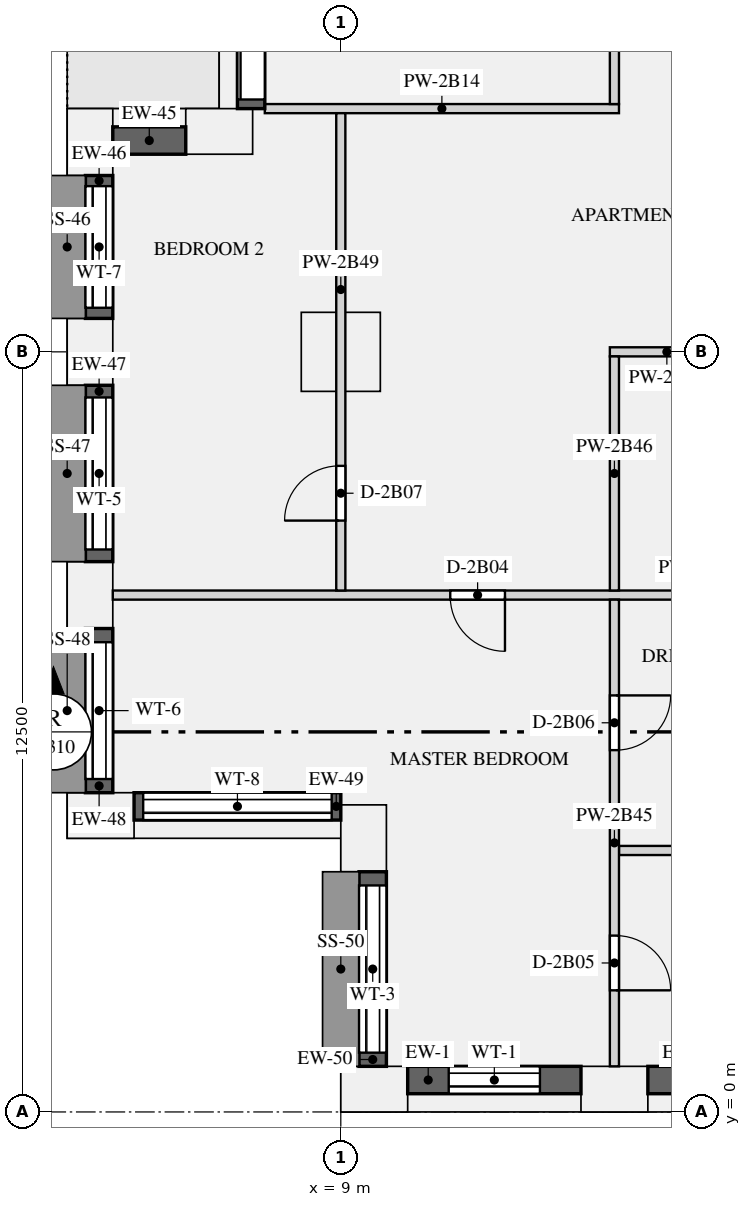
"""IFC4 building model, lengths in metres.
Left out: names, types, materials, properties, quantities, classifications, styles, units other than length and angle.
Written with IfcOpenShell. Run it as: python <this file> out.ifc"""

import sys

from ifc_helpers import new_model, si_unit, direction, frame, frame_2d, origin, origin_2d, place, context, subcontext, project, spatial, rectangle, extrude, element, fill, save


model = new_model("IFC4")
c1 = context("Model", 3, precision=1e-05, world=origin(), true_north=direction((0.0, 1.0)))
c2 = subcontext(c1, "Body", "Model", "MODEL_VIEW")
j1 = project(units=[si_unit("LENGTHUNIT", "METRE"), si_unit("PLANEANGLEUNIT", "RADIAN")], contexts=[c1])
p1 = place(None, origin())
s1 = spatial("IfcSite", under=j1, at=p1, CompositionType="ELEMENT")
p2 = place(p1, origin())
s2 = spatial("IfcBuilding", under=s1, at=p2, CompositionType="ELEMENT")
p3 = place(p2, frame((0.0, 0.0, 93.0)))
s3 = spatial("IfcBuildingStorey", under=s2, at=p3, CompositionType="ELEMENT", Elevation=93.0)
for number, where, z_axis, x_axis in (
    (1, (9.55, 0.375, 0.0), (0.0, 0.0, 1.0), (1.0, 0.0, 0.0)),
    (2, (13.5, 0.375, 0.0), (0.0, 0.0, 1.0), (1.0, 0.0, 0.0)),
    (3, (7.0, 16.125, 0.0), (0.0, 0.0, 1.0), (-1.0, 0.0, 0.0)),
    (4, (4.875, 15.95, 0.0), (0.0, 0.0, 1.0), (0.0, -1.0, 0.0)),
    (5, (4.875, 12.5, 0.0), (0.0, 0.0, 1.0), (0.0, -1.0, 0.0)),
    (6, (4.875, 8.5, 0.0), (0.0, 0.0, 1.0), (0.0, -1.0, 0.0)),
    (7, (5.05, 4.875, 0.0), (0.0, 0.0, 1.0), (1.0, 0.0, 0.0)),
    (8, (9.375, 4.5, 0.0), (0.0, 0.0, 1.0), (0.0, -1.0, 0.0)),
):
    element("IfcColumn", number, at=place(p3, frame(where, z_axis=z_axis, x_axis=x_axis)), inside=s3, PredefinedType="USERDEFINED", context=c2, shape_type="SweptSolid", body=[
        extrude(rectangle(XDim=1.1, YDim=0.75, at=origin_2d()), origin(), (0.0, 0.0, 1.0), 3.15),
    ])
p4 = place(p3, frame((9.0, 12.5, 0.0), z_axis=(0.0, 0.0, 1.0), x_axis=(1.0, 0.0, 0.0)))
e9 = element("IfcColumn", 9, at=p4, inside=s3, PredefinedType="COLUMN", context=c2, shape_type="SweptSolid", body=[
    extrude(rectangle(XDim=1.3, YDim=1.3, at=origin_2d()), origin(), (0.0, 0.0, 1.0), 3.15),
])
p5 = place(p3, frame((10.1, 0.525, 0.9), z_axis=(0.0, 0.0, 1.0), x_axis=(1.0, 0.0, 0.0)))
e10 = element("IfcWall", 10, at=p5, inside=s3, PredefinedType="SOLIDWALL", context=c2, shape_type="SweptSolid", body=[
    extrude(rectangle(XDim=2.85, YDim=0.45, at=frame_2d((1.425, 0.0))), origin(), (0.0, 0.0, 1.0), 1.93),
])
p6 = place(p5, frame((0.675, 0.0, 0.15)))
e11 = element("IfcOpeningElement", 11, at=p6, cuts=e10, PredefinedType="OPENING", context=c2, shape_type="SweptSolid", body=[
    extrude(rectangle(XDim=1.5, YDim=1.5, at=frame_2d((0.75, 0.75))), frame((0.0, 0.235, 0.0), z_axis=(0.0, -1.0, 0.0), x_axis=(1.0, 0.0, 0.0)), (0.0, 0.0, 1.0), 0.47),
])
p7 = place(p3, frame((14.05, 0.525, 0.9), z_axis=(0.0, 0.0, 1.0), x_axis=(1.0, 0.0, 0.0)))
e12 = element("IfcWall", 12, at=p7, inside=s3, PredefinedType="SOLIDWALL", context=c2, shape_type="SweptSolid", body=[
    extrude(rectangle(XDim=3.95, YDim=0.45, at=frame_2d((1.975, 0.0))), origin(), (0.0, 0.0, 1.0), 1.93),
])
p8 = place(p7, frame((1.225, 0.0, 0.15)))
e13 = element("IfcOpeningElement", 13, at=p8, cuts=e12, PredefinedType="OPENING", context=c2, shape_type="SweptSolid", body=[
    extrude(rectangle(XDim=1.5, YDim=1.5, at=frame_2d((0.75, 0.75))), frame((0.0, 0.235, 0.0), z_axis=(0.0, -1.0, 0.0), x_axis=(1.0, 0.0, 0.0)), (0.0, 0.0, 1.0), 0.47),
])
p9 = place(p3, frame((7.525, 19.95, 0.0), z_axis=(0.0, 0.0, 1.0), x_axis=(0.0, -1.0, 0.0)))
e14 = element("IfcWall", 14, at=p9, inside=s3, PredefinedType="SOLIDWALL", context=c2, shape_type="SweptSolid", body=[
    extrude(rectangle(XDim=3.45, YDim=0.45, at=frame_2d((1.725, 0.0))), origin(), (0.0, 0.0, 1.0), 2.83),
])
p10 = place(p9, frame((0.15, 0.0, 0.0)))
e15 = element("IfcOpeningElement", 15, at=p10, cuts=e14, PredefinedType="OPENING", context=c2, shape_type="SweptSolid", body=[
    extrude(rectangle(XDim=3.15, YDim=2.3, at=frame_2d((1.575, 1.15))), frame((0.0, 0.235, 0.0), z_axis=(0.0, -1.0, 0.0), x_axis=(1.0, 0.0, 0.0)), (0.0, 0.0, 1.0), 0.47),
])
p11 = place(p3, frame((6.45, 15.975, 0.9), z_axis=(0.0, 0.0, 1.0), x_axis=(-1.0, 0.0, 0.0)))
e16 = element("IfcWall", 16, at=p11, inside=s3, PredefinedType="SOLIDWALL", context=c2, shape_type="SweptSolid", body=[
    extrude(rectangle(XDim=1.2, YDim=0.45, at=frame_2d((0.6, 0.0))), origin(), (0.0, 0.0, 1.0), 1.93),
])
p12 = place(p3, frame((5.025, 15.4, 0.9), z_axis=(0.0, 0.0, 1.0), x_axis=(0.0, -1.0, 0.0)))
e17 = element("IfcWall", 17, at=p12, inside=s3, PredefinedType="SOLIDWALL", context=c2, shape_type="SweptSolid", body=[
    extrude(rectangle(XDim=2.35, YDim=0.45, at=frame_2d((1.175, 0.0))), origin(), (0.0, 0.0, 1.0), 1.93),
])
p13 = place(p12, frame((0.175, 0.0, 0.15)))
e18 = element("IfcOpeningElement", 18, at=p13, cuts=e17, PredefinedType="OPENING", context=c2, shape_type="SweptSolid", body=[
    extrude(rectangle(XDim=2.0, YDim=1.5, at=frame_2d((1.0, 0.75))), frame((0.0, 0.235, 0.0), z_axis=(0.0, -1.0, 0.0), x_axis=(1.0, 0.0, 0.0)), (0.0, 0.0, 1.0), 0.47),
])
p14 = place(p3, frame((5.025, 11.95, 0.9), z_axis=(0.0, 0.0, 1.0), x_axis=(0.0, -1.0, 0.0)))
e19 = element("IfcWall", 19, at=p14, inside=s3, PredefinedType="SOLIDWALL", context=c2, shape_type="SweptSolid", body=[
    extrude(rectangle(XDim=2.9, YDim=0.45, at=frame_2d((1.45, 0.0))), origin(), (0.0, 0.0, 1.0), 1.93),
])
p15 = place(p14, frame((0.2, 0.0, 0.15)))
e20 = element("IfcOpeningElement", 20, at=p15, cuts=e19, PredefinedType="OPENING", context=c2, shape_type="SweptSolid", body=[
    extrude(rectangle(XDim=2.5, YDim=1.5, at=frame_2d((1.25, 0.75))), frame((0.0, 0.235, 0.0), z_axis=(0.0, -1.0, 0.0), x_axis=(1.0, 0.0, 0.0)), (0.0, 0.0, 1.0), 0.47),
])
p16 = place(p3, frame((5.025, 7.95, 0.9), z_axis=(0.0, 0.0, 1.0), x_axis=(0.0, -1.0, 0.0)))
e21 = element("IfcWall", 21, at=p16, inside=s3, PredefinedType="SOLIDWALL", context=c2, shape_type="SweptSolid", body=[
    extrude(rectangle(XDim=2.7, YDim=0.45, at=frame_2d((1.35, 0.0))), origin(), (0.0, 0.0, 1.0), 1.93),
])
p17 = place(p16, frame((0.225, 0.0, 0.15)))
e22 = element("IfcOpeningElement", 22, at=p17, cuts=e21, PredefinedType="OPENING", context=c2, shape_type="SweptSolid", body=[
    extrude(rectangle(XDim=2.25, YDim=1.5, at=frame_2d((1.125, 0.75))), frame((0.0, 0.235, 0.0), z_axis=(0.0, -1.0, 0.0), x_axis=(1.0, 0.0, 0.0)), (0.0, 0.0, 1.0), 0.47),
])
p18 = place(p3, frame((5.6, 5.025, 0.9), z_axis=(0.0, 0.0, 1.0), x_axis=(1.0, 0.0, 0.0)))
e23 = element("IfcWall", 23, at=p18, inside=s3, PredefinedType="SOLIDWALL", context=c2, shape_type="SweptSolid", body=[
    extrude(rectangle(XDim=3.4, YDim=0.45, at=frame_2d((1.7, 0.0))), origin(), (0.0, 0.0, 1.0), 1.93),
])
p19 = place(p18, frame((0.15, 0.0, 0.15)))
e24 = element("IfcOpeningElement", 24, at=p19, cuts=e23, PredefinedType="OPENING", context=c2, shape_type="SweptSolid", body=[
    extrude(rectangle(XDim=3.1, YDim=1.5, at=frame_2d((1.55, 0.75))), frame((0.0, 0.235, 0.0), z_axis=(0.0, -1.0, 0.0), x_axis=(1.0, 0.0, 0.0)), (0.0, 0.0, 1.0), 0.47),
])
p20 = place(p3, frame((9.525, 3.95, 0.9), z_axis=(0.0, 0.0, 1.0), x_axis=(0.0, -1.0, 0.0)))
e25 = element("IfcWall", 25, at=p20, inside=s3, PredefinedType="SOLIDWALL", context=c2, shape_type="SweptSolid", body=[
    extrude(rectangle(XDim=3.2, YDim=0.45, at=frame_2d((1.6, 0.0))), origin(), (0.0, 0.0, 1.0), 1.93),
])
p21 = place(p20, frame((0.225, 0.0, 0.15)))
e26 = element("IfcOpeningElement", 26, at=p21, cuts=e25, PredefinedType="OPENING", context=c2, shape_type="SweptSolid", body=[
    extrude(rectangle(XDim=2.75, YDim=1.5, at=frame_2d((1.375, 0.75))), frame((0.0, 0.235, 0.0), z_axis=(0.0, -1.0, 0.0), x_axis=(1.0, 0.0, 0.0)), (0.0, 0.0, 1.0), 0.47),
])
p22 = place(p3, frame((5.25, 8.5, 0.0), z_axis=(0.0, 0.0, 1.0), x_axis=(1.0, 0.0, 0.0)))
e27 = element("IfcWall", 27, at=p22, inside=s3, PredefinedType="PARTITIONING", context=c2, shape_type="SweptSolid", body=[
    extrude(rectangle(XDim=12.75, YDim=0.15, at=frame_2d((6.375, 0.0))), origin(), (0.0, 0.0, 1.0), 2.83),
])
p23 = place(p22, frame((5.55, 0.0, 0.0)))
e28 = element("IfcOpeningElement", 28, at=p23, cuts=e27, PredefinedType="OPENING", context=c2, shape_type="SweptSolid", body=[
    extrude(rectangle(XDim=0.9, YDim=2.1, at=frame_2d((0.45, 1.05))), frame((0.0, 0.085, 0.0), z_axis=(0.0, -1.0, 0.0), x_axis=(1.0, 0.0, 0.0)), (0.0, 0.0, 1.0), 0.17),
])
p24 = place(p3, frame((13.575, 4.3, 0.0), z_axis=(0.0, 0.0, 1.0), x_axis=(1.0, 0.0, 0.0)))
e29 = element("IfcWall", 29, at=p24, inside=s3, PredefinedType="PARTITIONING", context=c2, shape_type="SweptSolid", body=[
    extrude(rectangle(XDim=4.425, YDim=0.15, at=frame_2d((2.212, 0.0))), origin(), (0.0, 0.0, 1.0), 2.83),
])
p25 = place(p3, frame((7.75, 16.5, 0.0), z_axis=(0.0, 0.0, 1.0), x_axis=(1.0, 0.0, 0.0)))
e30 = element("IfcWall", 30, at=p25, inside=s3, PredefinedType="PARTITIONING", context=c2, shape_type="SweptSolid", body=[
    extrude(rectangle(XDim=5.825, YDim=0.15, at=frame_2d((2.913, 0.0))), origin(), (0.0, 0.0, 1.0), 2.83),
])
p26 = place(p3, frame((13.425, 12.5, 0.0), z_axis=(0.0, 0.0, 1.0), x_axis=(1.0, 0.0, 0.0)))
e31 = element("IfcWall", 31, at=p26, inside=s3, PredefinedType="PARTITIONING", context=c2, shape_type="SweptSolid", body=[
    extrude(rectangle(XDim=4.575, YDim=0.15, at=frame_2d((2.288, 0.0))), origin(), (0.0, 0.0, 1.0), 2.83),
])
p27 = place(p26, frame((1.875, 0.0, 0.0)))
e32 = element("IfcOpeningElement", 32, at=p27, cuts=e31, PredefinedType="OPENING", context=c2, shape_type="SweptSolid", body=[
    extrude(rectangle(XDim=0.9, YDim=2.1, at=frame_2d((0.45, 1.05))), frame((0.0, 0.085, 0.0), z_axis=(0.0, -1.0, 0.0), x_axis=(1.0, 0.0, 0.0)), (0.0, 0.0, 1.0), 0.17),
])
p28 = place(p3, frame((13.5, 0.75, 0.0), z_axis=(0.0, 0.0, 1.0), x_axis=(0.0, 1.0, 0.0)))
e33 = element("IfcWall", 33, at=p28, inside=s3, PredefinedType="PARTITIONING", context=c2, shape_type="SweptSolid", body=[
    extrude(rectangle(XDim=7.675, YDim=0.15, at=frame_2d((3.837, 0.0))), origin(), (0.0, 0.0, 1.0), 2.83),
])
p29 = place(p28, frame((1.25, 0.0, 0.0)))
e34 = element("IfcOpeningElement", 34, at=p29, cuts=e33, PredefinedType="OPENING", context=c2, shape_type="SweptSolid", body=[
    extrude(rectangle(XDim=0.9, YDim=2.1, at=frame_2d((0.45, 1.05))), frame((0.0, 0.085, 0.0), z_axis=(0.0, -1.0, 0.0), x_axis=(1.0, 0.0, 0.0)), (0.0, 0.0, 1.0), 0.17),
])
p30 = place(p28, frame((5.2, 0.0, 0.0)))
e35 = element("IfcOpeningElement", 35, at=p30, cuts=e33, PredefinedType="OPENING", context=c2, shape_type="SweptSolid", body=[
    extrude(rectangle(XDim=0.9, YDim=2.1, at=frame_2d((0.45, 1.05))), frame((0.0, 0.085, 0.0), z_axis=(0.0, -1.0, 0.0), x_axis=(1.0, 0.0, 0.0)), (0.0, 0.0, 1.0), 0.17),
])
p31 = place(p3, frame((13.5, 8.575, 0.0), z_axis=(0.0, 0.0, 1.0), x_axis=(0.0, 1.0, 0.0)))
e36 = element("IfcWall", 36, at=p31, inside=s3, PredefinedType="PARTITIONING", context=c2, shape_type="SweptSolid", body=[
    extrude(rectangle(XDim=3.85, YDim=0.15, at=frame_2d((1.925, 0.0))), origin(), (0.0, 0.0, 1.0), 2.83),
])
p32 = place(p3, frame((13.5, 16.575, 0.0), z_axis=(0.0, 0.0, 1.0), x_axis=(0.0, 1.0, 0.0)))
e37 = element("IfcWall", 37, at=p32, inside=s3, PredefinedType="PARTITIONING", context=c2, shape_type="SweptSolid", body=[
    extrude(rectangle(XDim=6.325, YDim=0.15, at=frame_2d((3.163, 0.0))), origin(), (0.0, 0.0, 1.0), 2.83),
])
p33 = place(p32, frame((2.45, 0.0, 0.0)))
e38 = element("IfcOpeningElement", 38, at=p33, cuts=e37, PredefinedType="OPENING", context=c2, shape_type="SweptSolid", body=[
    extrude(rectangle(XDim=1.5, YDim=2.1, at=frame_2d((0.75, 1.05))), frame((0.0, 0.085, 0.0), z_axis=(0.0, -1.0, 0.0), x_axis=(1.0, 0.0, 0.0)), (0.0, 0.0, 1.0), 0.17),
])
p34 = place(p3, frame((9.0, 8.575, 0.0), z_axis=(0.0, 0.0, 1.0), x_axis=(0.0, 1.0, 0.0)))
e39 = element("IfcWall", 39, at=p34, inside=s3, PredefinedType="PARTITIONING", context=c2, shape_type="SweptSolid", body=[
    extrude(rectangle(XDim=7.85, YDim=0.15, at=frame_2d((3.925, 0.0))), origin(), (0.0, 0.0, 1.0), 2.83),
])
p35 = place(p34, frame((1.15, 0.0, 0.0)))
e40 = element("IfcOpeningElement", 40, at=p35, cuts=e39, PredefinedType="OPENING", context=c2, shape_type="SweptSolid", body=[
    extrude(rectangle(XDim=0.9, YDim=2.1, at=frame_2d((0.45, 1.05))), frame((0.0, 0.085, 0.0), z_axis=(0.0, -1.0, 0.0), x_axis=(1.0, 0.0, 0.0)), (0.0, 0.0, 1.0), 0.17),
])
p36 = place(p6, origin())
e41 = element("IfcWindow", 41, at=p36, inside=s3, PartitioningType="SINGLE_PANEL", PredefinedType="WINDOW", context=c2, shape_type="SweptSolid", body=[
    extrude(rectangle(XDim=1.5, YDim=1.5, at=frame_2d((0.75, 0.75))), frame((0.0, -0.065, 0.0), z_axis=(0.0, -1.0, 0.0), x_axis=(1.0, 0.0, 0.0)), (0.0, 0.0, 1.0), 0.06),
])
fill(e11, e41)
p37 = place(p10, origin())
e42 = element("IfcDoor", 42, at=p37, inside=s3, OperationType="SLIDING_TO_LEFT", PredefinedType="DOOR", context=c2, shape_type="SweptSolid", body=[
    extrude(rectangle(XDim=3.15, YDim=2.3, at=frame_2d((1.575, 1.15))), frame((0.0, -0.07, 0.0), z_axis=(0.0, -1.0, 0.0), x_axis=(1.0, 0.0, 0.0)), (0.0, 0.0, 1.0), 0.05),
])
fill(e15, e42)
p38 = place(p13, origin())
e43 = element("IfcWindow", 43, at=p38, inside=s3, PartitioningType="SINGLE_PANEL", PredefinedType="WINDOW", context=c2, shape_type="SweptSolid", body=[
    extrude(rectangle(XDim=2.0, YDim=1.5, at=frame_2d((1.0, 0.75))), frame((0.0, -0.065, 0.0), z_axis=(0.0, -1.0, 0.0), x_axis=(1.0, 0.0, 0.0)), (0.0, 0.0, 1.0), 0.06),
])
fill(e18, e43)
p39 = place(p15, origin())
e44 = element("IfcWindow", 44, at=p39, inside=s3, PartitioningType="SINGLE_PANEL", PredefinedType="WINDOW", context=c2, shape_type="SweptSolid", body=[
    extrude(rectangle(XDim=2.5, YDim=1.5, at=frame_2d((1.25, 0.75))), frame((0.0, -0.065, 0.0), z_axis=(0.0, -1.0, 0.0), x_axis=(1.0, 0.0, 0.0)), (0.0, 0.0, 1.0), 0.06),
])
fill(e20, e44)
p40 = place(p17, origin())
e45 = element("IfcWindow", 45, at=p40, inside=s3, PartitioningType="SINGLE_PANEL", PredefinedType="WINDOW", context=c2, shape_type="SweptSolid", body=[
    extrude(rectangle(XDim=2.25, YDim=1.5, at=frame_2d((1.125, 0.75))), frame((0.0, -0.065, 0.0), z_axis=(0.0, -1.0, 0.0), x_axis=(1.0, 0.0, 0.0)), (0.0, 0.0, 1.0), 0.06),
])
fill(e22, e45)
p41 = place(p19, origin())
e46 = element("IfcWindow", 46, at=p41, inside=s3, PartitioningType="SINGLE_PANEL", PredefinedType="WINDOW", context=c2, shape_type="SweptSolid", body=[
    extrude(rectangle(XDim=3.1, YDim=1.5, at=frame_2d((1.55, 0.75))), frame((0.0, -0.065, 0.0), z_axis=(0.0, -1.0, 0.0), x_axis=(1.0, 0.0, 0.0)), (0.0, 0.0, 1.0), 0.06),
])
fill(e24, e46)
p42 = place(p21, origin())
e47 = element("IfcWindow", 47, at=p42, inside=s3, PartitioningType="SINGLE_PANEL", PredefinedType="WINDOW", context=c2, shape_type="SweptSolid", body=[
    extrude(rectangle(XDim=2.75, YDim=1.5, at=frame_2d((1.375, 0.75))), frame((0.0, -0.065, 0.0), z_axis=(0.0, -1.0, 0.0), x_axis=(1.0, 0.0, 0.0)), (0.0, 0.0, 1.0), 0.06),
])
fill(e26, e47)
p43 = place(p23, frame((0.9, 0.0, 0.0), z_axis=(0.0, 0.0, 1.0), x_axis=(-1.0, 0.0, 0.0)))
e48 = element("IfcDoor", 48, at=p43, inside=s3, OperationType="SINGLE_SWING_LEFT", PredefinedType="DOOR", context=c2, shape_type="SweptSolid", body=[
    extrude(rectangle(XDim=0.9, YDim=2.1, at=frame_2d((0.45, 1.05))), frame((0.0, 0.025, 0.0), z_axis=(0.0, -1.0, 0.0), x_axis=(1.0, 0.0, 0.0)), (0.0, 0.0, 1.0), 0.05),
])
fill(e28, e48)
p44 = place(p29, frame((0.9, 0.0, 0.0), z_axis=(0.0, 0.0, 1.0), x_axis=(-1.0, 0.0, 0.0)))
e49 = element("IfcDoor", 49, at=p44, inside=s3, OperationType="SINGLE_SWING_RIGHT", PredefinedType="DOOR", context=c2, shape_type="SweptSolid", body=[
    extrude(rectangle(XDim=0.9, YDim=2.1, at=frame_2d((0.45, 1.05))), frame((0.0, 0.025, 0.0), z_axis=(0.0, -1.0, 0.0), x_axis=(1.0, 0.0, 0.0)), (0.0, 0.0, 1.0), 0.05),
])
fill(e34, e49)
p45 = place(p30, frame((0.9, 0.0, 0.0), z_axis=(0.0, 0.0, 1.0), x_axis=(-1.0, 0.0, 0.0)))
e50 = element("IfcDoor", 50, at=p45, inside=s3, OperationType="SINGLE_SWING_LEFT", PredefinedType="DOOR", context=c2, shape_type="SweptSolid", body=[
    extrude(rectangle(XDim=0.9, YDim=2.1, at=frame_2d((0.45, 1.05))), frame((0.0, 0.025, 0.0), z_axis=(0.0, -1.0, 0.0), x_axis=(1.0, 0.0, 0.0)), (0.0, 0.0, 1.0), 0.05),
])
fill(e35, e50)
p46 = place(p35, origin())
e51 = element("IfcDoor", 51, at=p46, inside=s3, OperationType="SINGLE_SWING_LEFT", PredefinedType="DOOR", context=c2, shape_type="SweptSolid", body=[
    extrude(rectangle(XDim=0.9, YDim=2.1, at=frame_2d((0.45, 1.05))), frame((0.0, 0.025, 0.0), z_axis=(0.0, -1.0, 0.0), x_axis=(1.0, 0.0, 0.0)), (0.0, 0.0, 1.0), 0.05),
])
fill(e40, e51)
save(model, sys.argv[1])
